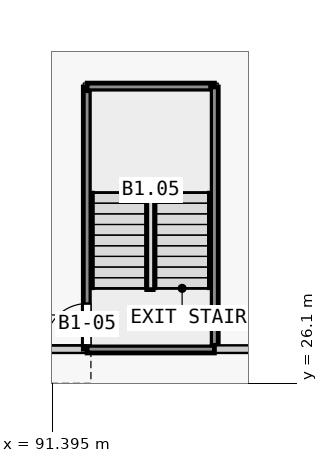
"""IFC4 building model, lengths in metres.
Left out: names, types, materials, properties, quantities, classifications, styles, units other than length and angle.
Written with IfcOpenShell. Run it as: python <this file> out.ifc"""

import sys

from ifc_helpers import new_model, si_unit, direction, frame, frame_2d, origin, place, context, subcontext, project, spatial, rectangle, extrude, element, fill, save


model = new_model("IFC4")
c1 = context("Model", 3, precision=1e-05, world=origin(), true_north=direction((0.0, 1.0)))
c2 = subcontext(c1, "Body", "Model", "MODEL_VIEW")
j1 = project(units=[si_unit("LENGTHUNIT", "METRE"), si_unit("PLANEANGLEUNIT", "RADIAN")], contexts=[c1])
p1 = place(None, origin())
s1 = spatial("IfcSite", under=j1, at=p1, CompositionType="ELEMENT")
p2 = place(p1, origin())
s2 = spatial("IfcBuilding", under=s1, at=p2, CompositionType="ELEMENT")
p3 = place(p2, frame((0.0, 0.0, -7.0)))
s3 = spatial("IfcBuildingStorey", under=s2, at=p3, CompositionType="ELEMENT", Elevation=-7.0)
p4 = place(p3, frame((90.6, 27.0, 0.0), z_axis=(0.0, 0.0, 1.0), x_axis=(1.0, 0.0, 0.0)))
e1 = element("IfcWall", 1, at=p4, inside=s3, PredefinedType="PARTITIONING", context=c2, shape_type="SweptSolid", body=[
    extrude(rectangle(XDim=1.7, YDim=0.2, at=frame_2d((0.85, 0.0))), origin(), (0.0, 0.0, 1.0), 6.55),
])
p5 = place(p3, frame((92.3, 27.0, 0.0), z_axis=(0.0, 0.0, 1.0), x_axis=(0.0, 1.0, 0.0)))
e2 = element("IfcWall", 2, at=p5, inside=s3, PredefinedType="PARTITIONING", context=c2, shape_type="SweptSolid", body=[
    extrude(rectangle(XDim=6.9, YDim=0.2, at=frame_2d((3.45, 0.0))), origin(), (0.0, 0.0, 1.0), 6.55),
])
p6 = place(p5, frame((0.1, 0.0, 0.0)))
e3 = element("IfcOpeningElement", 3, at=p6, cuts=e2, PredefinedType="OPENING", context=c2, shape_type="SweptSolid", body=[
    extrude(rectangle(XDim=1.1, YDim=2.1, at=frame_2d((0.55, 1.05))), frame((0.0, 0.11, 0.0), z_axis=(0.0, -1.0, 0.0), x_axis=(1.0, 0.0, 0.0)), (0.0, 0.0, 1.0), 0.22),
])
p7 = place(p3, frame((92.3, 33.9, 0.0), z_axis=(0.0, 0.0, 1.0), x_axis=(1.0, 0.0, 0.0)))
e4 = element("IfcWall", 4, at=p7, inside=s3, PredefinedType="PARTITIONING", context=c2, shape_type="SweptSolid", body=[
    extrude(rectangle(XDim=3.35, YDim=0.2, at=frame_2d((1.675, 0.0))), origin(), (0.0, 0.0, 1.0), 6.55),
])
p8 = place(p3, frame((95.65, 33.9, 0.0), z_axis=(0.0, 0.0, 1.0), x_axis=(0.0, -1.0, 0.0)))
e5 = element("IfcWall", 5, at=p8, inside=s3, PredefinedType="PARTITIONING", context=c2, shape_type="SweptSolid", body=[
    extrude(rectangle(XDim=6.9, YDim=0.2, at=frame_2d((3.45, 0.0))), origin(), (0.0, 0.0, 1.0), 6.55),
])
p9 = place(p3, frame((95.65, 27.0, 0.0), z_axis=(0.0, 0.0, 1.0), x_axis=(1.0, 0.0, 0.0)))
e6 = element("IfcWall", 6, at=p9, inside=s3, PredefinedType="PARTITIONING", context=c2, shape_type="SweptSolid", body=[
    extrude(rectangle(XDim=2.75, YDim=0.2, at=frame_2d((1.375, 0.0))), origin(), (0.0, 0.0, 1.0), 6.55),
])
p10 = place(p3, frame((95.65, 27.0, 0.0), z_axis=(0.0, 0.0, 1.0), x_axis=(-1.0, 0.0, 0.0)))
e7 = element("IfcWall", 7, at=p10, inside=s3, PredefinedType="PARTITIONING", context=c2, shape_type="SweptSolid", body=[
    extrude(rectangle(XDim=3.35, YDim=0.2, at=frame_2d((1.675, 0.0))), origin(), (0.0, 0.0, 1.0), 6.55),
])
p11 = place(p6, origin())
e8 = element("IfcDoor", 8, at=p11, inside=s3, OperationType="SINGLE_SWING_LEFT", PredefinedType="DOOR", context=c2, shape_type="SweptSolid", body=[
    extrude(rectangle(XDim=1.1, YDim=2.1, at=frame_2d((0.55, 1.05))), frame((0.0, 0.025, 0.0), z_axis=(0.0, -1.0, 0.0), x_axis=(1.0, 0.0, 0.0)), (0.0, 0.0, 1.0), 0.05),
])
fill(e3, e8)
save(model, sys.argv[1])
